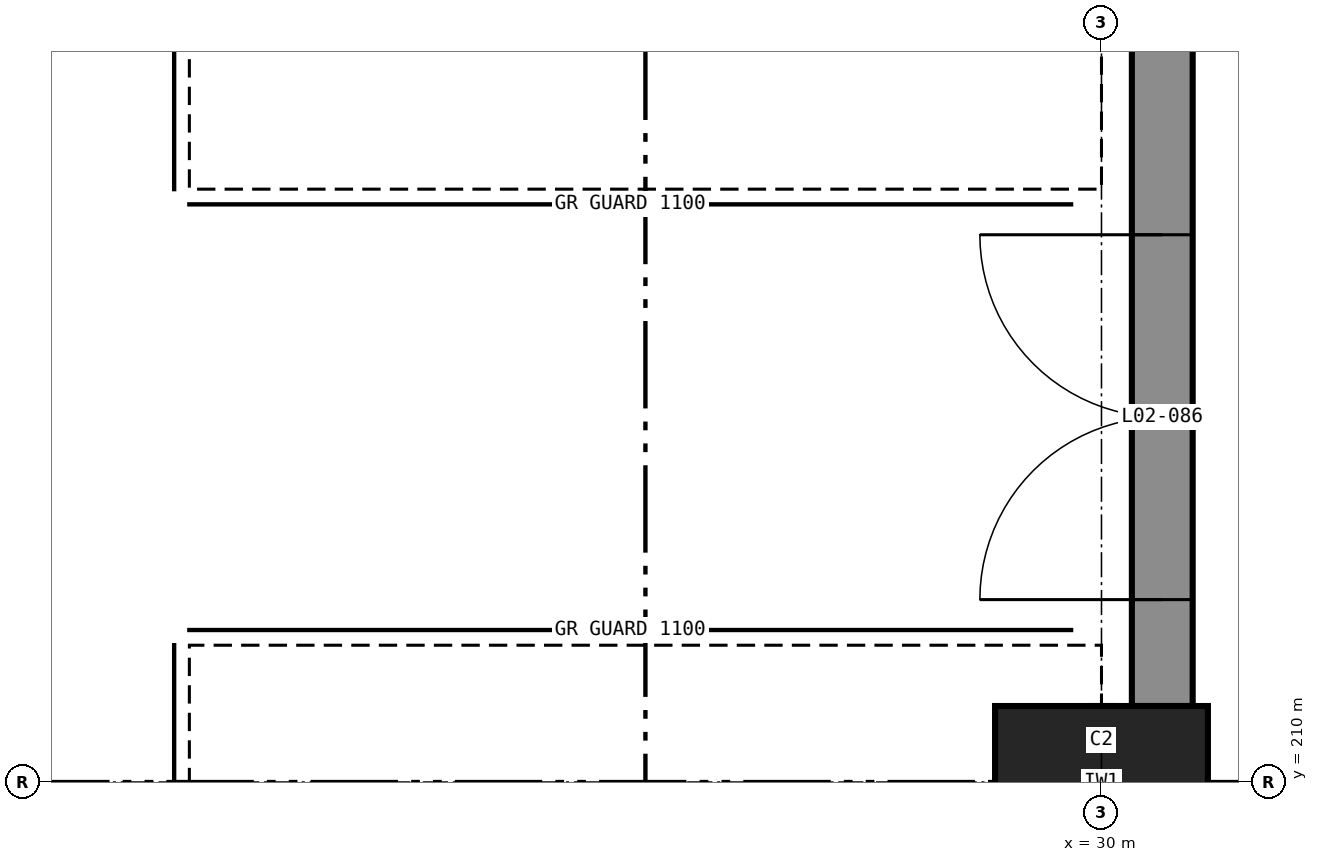
"""IFC4 building model, lengths in metres.
Left out: names, types, materials, properties, quantities, classifications, styles, units other than length and angle.
Written with IfcOpenShell. Run it as: python <this file> out.ifc"""

import sys

from ifc_helpers import new_model, si_unit, direction, frame, frame_2d, origin, origin_2d, place, context, subcontext, project, spatial, rectangle, extrude, element, fill, save


model = new_model("IFC4")
c1 = context("Model", 3, precision=1e-05, world=origin(), true_north=direction((0.0, 1.0)))
c2 = subcontext(c1, "Body", "Model", "MODEL_VIEW")
j1 = project(units=[si_unit("LENGTHUNIT", "METRE"), si_unit("PLANEANGLEUNIT", "RADIAN")], contexts=[c1])
p1 = place(None, origin())
s1 = spatial("IfcSite", under=j1, at=p1, CompositionType="ELEMENT")
p2 = place(p1, origin())
s2 = spatial("IfcBuilding", under=s1, at=p2, CompositionType="ELEMENT")
p3 = place(p2, frame((0.0, 0.0, 12.0)))
s3 = spatial("IfcBuildingStorey", under=s2, at=p3, CompositionType="ELEMENT", Elevation=12.0)
p4 = place(p3, frame((30.0, 210.0, 0.0), z_axis=(0.0, 0.0, 1.0), x_axis=(1.0, 0.0, 0.0)))
e1 = element("IfcColumn", 1, at=p4, inside=s3, PredefinedType="COLUMN", context=c2, shape_type="SweptSolid", body=[
    extrude(rectangle(XDim=1.4, YDim=1.0, at=origin_2d()), origin(), (0.0, 0.0, 1.0), 4.825),
])
p5 = place(p3, frame((30.4, 210.5, 0.0), z_axis=(0.0, 0.0, 1.0), x_axis=(0.0, 1.0, 0.0)))
e2 = element("IfcWall", 2, at=p5, inside=s3, PredefinedType="SOLIDWALL", context=c2, shape_type="SweptSolid", body=[
    extrude(rectangle(XDim=9.5, YDim=0.4, at=frame_2d((4.75, 0.0))), origin(), (0.0, 0.0, 1.0), 5.0),
])
p6 = place(p5, frame((0.7, 0.0, 0.0)))
e3 = element("IfcOpeningElement", 3, at=p6, cuts=e2, PredefinedType="OPENING", context=c2, shape_type="SweptSolid", body=[
    extrude(rectangle(XDim=2.4, YDim=2.4, at=frame_2d((1.2, 1.2))), frame((0.0, 0.21, 0.0), z_axis=(0.0, -1.0, 0.0), x_axis=(1.0, 0.0, 0.0)), (0.0, 0.0, 1.0), 0.42),
])
p7 = place(p3, frame((30.0, 209.5, 0.0), z_axis=(0.0, 0.0, 1.0), x_axis=(0.0, 1.0, 0.0)))
e4 = element("IfcWall", 4, at=p7, inside=s3, PredefinedType="PARTITIONING", context=c2, shape_type="SweptSolid", body=[
    extrude(rectangle(XDim=1.0, YDim=0.15, at=frame_2d((0.5, 0.0))), origin(), (0.0, 0.0, 1.0), 4.825),
])
p8 = place(p6, origin())
e5 = element("IfcDoor", 5, at=p8, inside=s3, OperationType="DOUBLE_DOOR_SINGLE_SWING", PredefinedType="DOOR", context=c2, shape_type="SweptSolid", body=[
    extrude(rectangle(XDim=2.4, YDim=2.4, at=frame_2d((1.2, 1.2))), frame((0.0, 0.025, 0.0), z_axis=(0.0, -1.0, 0.0), x_axis=(1.0, 0.0, 0.0)), (0.0, 0.0, 1.0), 0.05),
])
fill(e3, e5)
save(model, sys.argv[1])
